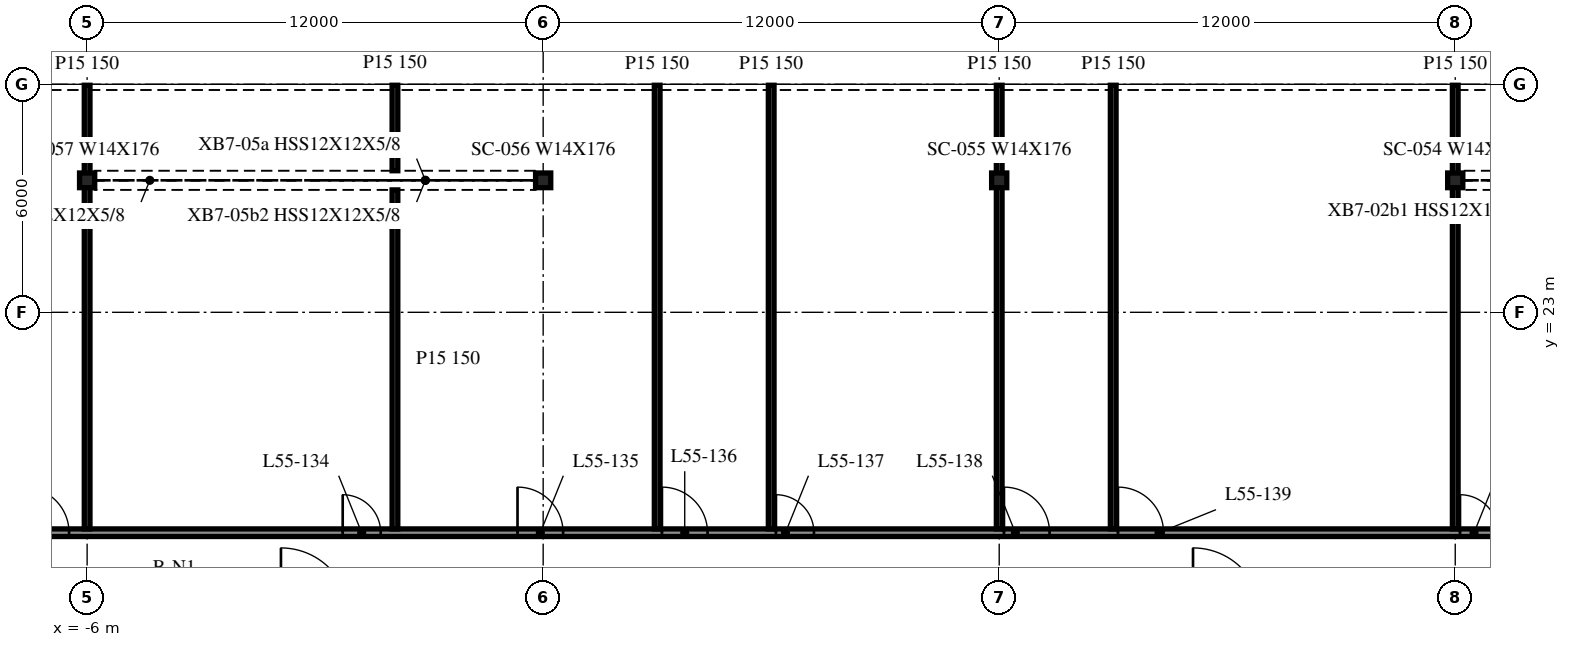
"""IFC4 building model, lengths in metres.
Left out: names, types, materials, properties, quantities, classifications, styles, units other than length and angle.
Written with IfcOpenShell. Run it as: python <this file> out.ifc"""

import sys

from ifc_helpers import new_model, si_unit, direction, frame, frame_2d, origin, origin_2d, place, context, subcontext, project, spatial, rectangle, i_section, extrude, element, fill, save


model = new_model("IFC4")
c1 = context("Model", 3, precision=1e-05, world=origin(), true_north=direction((0.0, 1.0)))
c2 = subcontext(c1, "Body", "Model", "MODEL_VIEW")
j1 = project(units=[si_unit("LENGTHUNIT", "METRE"), si_unit("PLANEANGLEUNIT", "RADIAN")], contexts=[c1])
p1 = place(None, origin())
s1 = spatial("IfcSite", under=j1, at=p1, CompositionType="ELEMENT")
p2 = place(p1, origin())
s2 = spatial("IfcBuilding", under=s1, at=p2, CompositionType="ELEMENT")
p3 = place(p2, frame((0.0, 0.0, 228.6)))
s3 = spatial("IfcBuildingStorey", under=s2, at=p3, CompositionType="ELEMENT", Elevation=228.6)
for number, where, z_axis, x_axis in (
    (1, (30.0, 26.473, -0.34), (0.0, 0.0, 1.0), (1.0, 0.0, 0.0)),
    (2, (18.0, 26.473, -0.34), (0.0, 0.0, 1.0), (1.0, 0.0, 0.0)),
    (3, (6.0, 26.473, -0.34), (0.0, 0.0, 1.0), (1.0, 0.0, 0.0)),
    (4, (-6.0, 26.473, -0.34), (0.0, 0.0, 1.0), (1.0, 0.0, 0.0)),
):
    element("IfcColumn", number, at=place(p3, frame(where, z_axis=z_axis, x_axis=x_axis)), inside=s3, PredefinedType="COLUMN", context=c2, shape_type="SweptSolid", body=[
        extrude(i_section(OverallWidth=0.399, OverallDepth=0.386, WebThickness=0.021, FlangeThickness=0.033, at=origin_2d()), origin(), (0.0, 0.0, 1.0), 3.8),
    ])
p4 = place(p3, frame((-41.975, 17.2, 0.0), z_axis=(0.0, 0.0, 1.0), x_axis=(1.0, 0.0, 0.0)))
e5 = element("IfcWall", 5, at=p4, inside=s3, PredefinedType="PARTITIONING", context=c2, shape_type="SweptSolid", body=[
    extrude(rectangle(XDim=95.95, YDim=0.2, at=frame_2d((47.975, 0.0))), origin(), (0.0, 0.0, 1.0), 3.46),
])
p5 = place(p4, frame((4.5, 0.0, 0.0)))
e6 = element("IfcOpeningElement", 6, at=p5, cuts=e5, PredefinedType="OPENING", context=c2, shape_type="SweptSolid", body=[
    extrude(rectangle(XDim=1.0, YDim=2.1, at=frame_2d((0.5, 1.05))), frame((0.0, 0.11, 0.0), z_axis=(0.0, -1.0, 0.0), x_axis=(1.0, 0.0, 0.0)), (0.0, 0.0, 1.0), 0.22),
])
p6 = place(p4, frame((13.3, 0.0, 0.0)))
e7 = element("IfcOpeningElement", 7, at=p6, cuts=e5, PredefinedType="OPENING", context=c2, shape_type="SweptSolid", body=[
    extrude(rectangle(XDim=1.2, YDim=2.1, at=frame_2d((0.6, 1.05))), frame((0.0, 0.11, 0.0), z_axis=(0.0, -1.0, 0.0), x_axis=(1.0, 0.0, 0.0)), (0.0, 0.0, 1.0), 0.22),
])
p7 = place(p4, frame((16.3, 0.0, 0.0)))
e8 = element("IfcOpeningElement", 8, at=p7, cuts=e5, PredefinedType="OPENING", context=c2, shape_type="SweptSolid", body=[
    extrude(rectangle(XDim=1.2, YDim=2.1, at=frame_2d((0.6, 1.05))), frame((0.0, 0.11, 0.0), z_axis=(0.0, -1.0, 0.0), x_axis=(1.0, 0.0, 0.0)), (0.0, 0.0, 1.0), 0.22),
])
p8 = place(p4, frame((22.5, 0.0, 0.0)))
e9 = element("IfcOpeningElement", 9, at=p8, cuts=e5, PredefinedType="OPENING", context=c2, shape_type="SweptSolid", body=[
    extrude(rectangle(XDim=1.0, YDim=2.1, at=frame_2d((0.5, 1.05))), frame((0.0, 0.11, 0.0), z_axis=(0.0, -1.0, 0.0), x_axis=(1.0, 0.0, 0.0)), (0.0, 0.0, 1.0), 0.22),
])
p9 = place(p4, frame((25.3, 0.0, 0.0)))
e10 = element("IfcOpeningElement", 10, at=p9, cuts=e5, PredefinedType="OPENING", context=c2, shape_type="SweptSolid", body=[
    extrude(rectangle(XDim=1.2, YDim=2.1, at=frame_2d((0.6, 1.05))), frame((0.0, 0.11, 0.0), z_axis=(0.0, -1.0, 0.0), x_axis=(1.0, 0.0, 0.0)), (0.0, 0.0, 1.0), 0.22),
])
p10 = place(p4, frame((34.3, 0.0, 0.0)))
e11 = element("IfcOpeningElement", 11, at=p10, cuts=e5, PredefinedType="OPENING", context=c2, shape_type="SweptSolid", body=[
    extrude(rectangle(XDim=1.2, YDim=2.1, at=frame_2d((0.6, 1.05))), frame((0.0, 0.11, 0.0), z_axis=(0.0, -1.0, 0.0), x_axis=(1.0, 0.0, 0.0)), (0.0, 0.0, 1.0), 0.22),
])
p11 = place(p4, frame((42.7, 0.0, 0.0)))
e12 = element("IfcOpeningElement", 12, at=p11, cuts=e5, PredefinedType="OPENING", context=c2, shape_type="SweptSolid", body=[
    extrude(rectangle(XDim=1.0, YDim=2.1, at=frame_2d((0.5, 1.05))), frame((0.0, 0.11, 0.0), z_axis=(0.0, -1.0, 0.0), x_axis=(1.0, 0.0, 0.0)), (0.0, 0.0, 1.0), 0.22),
])
p12 = place(p4, frame((47.3, 0.0, 0.0)))
e13 = element("IfcOpeningElement", 13, at=p12, cuts=e5, PredefinedType="OPENING", context=c2, shape_type="SweptSolid", body=[
    extrude(rectangle(XDim=1.2, YDim=2.1, at=frame_2d((0.6, 1.05))), frame((0.0, 0.11, 0.0), z_axis=(0.0, -1.0, 0.0), x_axis=(1.0, 0.0, 0.0)), (0.0, 0.0, 1.0), 0.22),
])
p13 = place(p4, frame((51.1, 0.0, 0.0)))
e14 = element("IfcOpeningElement", 14, at=p13, cuts=e5, PredefinedType="OPENING", context=c2, shape_type="SweptSolid", body=[
    extrude(rectangle(XDim=1.2, YDim=2.1, at=frame_2d((0.6, 1.05))), frame((0.0, 0.11, 0.0), z_axis=(0.0, -1.0, 0.0), x_axis=(1.0, 0.0, 0.0)), (0.0, 0.0, 1.0), 0.22),
])
p14 = place(p4, frame((54.1, 0.0, 0.0)))
e15 = element("IfcOpeningElement", 15, at=p14, cuts=e5, PredefinedType="OPENING", context=c2, shape_type="SweptSolid", body=[
    extrude(rectangle(XDim=1.0, YDim=2.1, at=frame_2d((0.5, 1.05))), frame((0.0, 0.11, 0.0), z_axis=(0.0, -1.0, 0.0), x_axis=(1.0, 0.0, 0.0)), (0.0, 0.0, 1.0), 0.22),
])
p15 = place(p4, frame((60.1, 0.0, 0.0)))
e16 = element("IfcOpeningElement", 16, at=p15, cuts=e5, PredefinedType="OPENING", context=c2, shape_type="SweptSolid", body=[
    extrude(rectangle(XDim=1.2, YDim=2.1, at=frame_2d((0.6, 1.05))), frame((0.0, 0.11, 0.0), z_axis=(0.0, -1.0, 0.0), x_axis=(1.0, 0.0, 0.0)), (0.0, 0.0, 1.0), 0.22),
])
p16 = place(p4, frame((63.1, 0.0, 0.0)))
e17 = element("IfcOpeningElement", 17, at=p16, cuts=e5, PredefinedType="OPENING", context=c2, shape_type="SweptSolid", body=[
    extrude(rectangle(XDim=1.2, YDim=2.1, at=frame_2d((0.6, 1.05))), frame((0.0, 0.11, 0.0), z_axis=(0.0, -1.0, 0.0), x_axis=(1.0, 0.0, 0.0)), (0.0, 0.0, 1.0), 0.22),
])
p17 = place(p4, frame((72.1, 0.0, 0.0)))
e18 = element("IfcOpeningElement", 18, at=p17, cuts=e5, PredefinedType="OPENING", context=c2, shape_type="SweptSolid", body=[
    extrude(rectangle(XDim=1.0, YDim=2.1, at=frame_2d((0.5, 1.05))), frame((0.0, 0.11, 0.0), z_axis=(0.0, -1.0, 0.0), x_axis=(1.0, 0.0, 0.0)), (0.0, 0.0, 1.0), 0.22),
])
p18 = place(p4, frame((78.1, 0.0, 0.0)))
e19 = element("IfcOpeningElement", 19, at=p18, cuts=e5, PredefinedType="OPENING", context=c2, shape_type="SweptSolid", body=[
    extrude(rectangle(XDim=1.2, YDim=2.1, at=frame_2d((0.6, 1.05))), frame((0.0, 0.11, 0.0), z_axis=(0.0, -1.0, 0.0), x_axis=(1.0, 0.0, 0.0)), (0.0, 0.0, 1.0), 0.22),
])
p19 = place(p4, frame((87.1, 0.0, 0.0)))
e20 = element("IfcOpeningElement", 20, at=p19, cuts=e5, PredefinedType="OPENING", context=c2, shape_type="SweptSolid", body=[
    extrude(rectangle(XDim=1.2, YDim=2.1, at=frame_2d((0.6, 1.05))), frame((0.0, 0.11, 0.0), z_axis=(0.0, -1.0, 0.0), x_axis=(1.0, 0.0, 0.0)), (0.0, 0.0, 1.0), 0.22),
])
p20 = place(p4, frame((90.1, 0.0, 0.0)))
e21 = element("IfcOpeningElement", 21, at=p20, cuts=e5, PredefinedType="OPENING", context=c2, shape_type="SweptSolid", body=[
    extrude(rectangle(XDim=1.0, YDim=2.1, at=frame_2d((0.5, 1.05))), frame((0.0, 0.11, 0.0), z_axis=(0.0, -1.0, 0.0), x_axis=(1.0, 0.0, 0.0)), (0.0, 0.0, 1.0), 0.22),
])
p21 = place(p3, frame((-6.0, 17.3, 0.0), z_axis=(0.0, 0.0, 1.0), x_axis=(0.0, 1.0, 0.0)))
e22 = element("IfcWall", 22, at=p21, inside=s3, PredefinedType="PARTITIONING", context=c2, shape_type="SweptSolid", body=[
    extrude(rectangle(XDim=11.675, YDim=0.15, at=frame_2d((5.837, 0.0))), origin(), (0.0, 0.0, 1.0), 3.46),
])
p22 = place(p3, frame((2.1, 17.3, 0.0), z_axis=(0.0, 0.0, 1.0), x_axis=(0.0, 1.0, 0.0)))
e23 = element("IfcWall", 23, at=p22, inside=s3, PredefinedType="PARTITIONING", context=c2, shape_type="SweptSolid", body=[
    extrude(rectangle(XDim=8.921, YDim=0.15, at=frame_2d((4.46, 0.0))), origin(), (0.0, 0.0, 1.0), 3.46),
])
p23 = place(p3, frame((2.1, 26.725, 0.0), z_axis=(0.0, 0.0, 1.0), x_axis=(0.0, 1.0, 0.0)))
e24 = element("IfcWall", 24, at=p23, inside=s3, PredefinedType="PARTITIONING", context=c2, shape_type="SweptSolid", body=[
    extrude(rectangle(XDim=2.25, YDim=0.15, at=frame_2d((1.125, 0.0))), origin(), (0.0, 0.0, 1.0), 3.46),
])
for number, where, z_axis, x_axis in (
    (25, (9.0, 17.3, 0.0), (0.0, 0.0, 1.0), (0.0, 1.0, 0.0)),
    (26, (12.0, 17.3, 0.0), (0.0, 0.0, 1.0), (0.0, 1.0, 0.0)),
    (27, (18.0, 17.3, 0.0), (0.0, 0.0, 1.0), (0.0, 1.0, 0.0)),
    (28, (21.0, 17.3, 0.0), (0.0, 0.0, 1.0), (0.0, 1.0, 0.0)),
    (29, (30.0, 17.3, 0.0), (0.0, 0.0, 1.0), (0.0, 1.0, 0.0)),
):
    element("IfcWall", number, at=place(p3, frame(where, z_axis=z_axis, x_axis=x_axis)), inside=s3, PredefinedType="PARTITIONING", context=c2, shape_type="SweptSolid", body=[
        extrude(rectangle(XDim=11.675, YDim=0.15, at=frame_2d((5.837, 0.0))), origin(), (0.0, 0.0, 1.0), 3.46),
    ])
p24 = place(p10, origin())
e30 = element("IfcDoor", 30, at=p24, inside=s3, OperationType="SINGLE_SWING_LEFT", PredefinedType="DOOR", context=c2, shape_type="SweptSolid", body=[
    extrude(rectangle(XDim=1.2, YDim=2.1, at=frame_2d((0.6, 1.05))), frame((0.0, 0.025, 0.0), z_axis=(0.0, -1.0, 0.0), x_axis=(1.0, 0.0, 0.0)), (0.0, 0.0, 1.0), 0.05),
])
fill(e11, e30)
p25 = place(p11, origin())
e31 = element("IfcDoor", 31, at=p25, inside=s3, OperationType="SINGLE_SWING_LEFT", PredefinedType="DOOR", context=c2, shape_type="SweptSolid", body=[
    extrude(rectangle(XDim=1.0, YDim=2.1, at=frame_2d((0.5, 1.05))), frame((0.0, 0.025, 0.0), z_axis=(0.0, -1.0, 0.0), x_axis=(1.0, 0.0, 0.0)), (0.0, 0.0, 1.0), 0.05),
])
fill(e12, e31)
p26 = place(p12, origin())
e32 = element("IfcDoor", 32, at=p26, inside=s3, OperationType="SINGLE_SWING_RIGHT", PredefinedType="DOOR", context=c2, shape_type="SweptSolid", body=[
    extrude(rectangle(XDim=1.2, YDim=2.1, at=frame_2d((0.6, 1.05))), frame((0.0, 0.025, 0.0), z_axis=(0.0, -1.0, 0.0), x_axis=(1.0, 0.0, 0.0)), (0.0, 0.0, 1.0), 0.05),
])
fill(e13, e32)
p27 = place(p13, origin())
e33 = element("IfcDoor", 33, at=p27, inside=s3, OperationType="SINGLE_SWING_RIGHT", PredefinedType="DOOR", context=c2, shape_type="SweptSolid", body=[
    extrude(rectangle(XDim=1.2, YDim=2.1, at=frame_2d((0.6, 1.05))), frame((0.0, 0.025, 0.0), z_axis=(0.0, -1.0, 0.0), x_axis=(1.0, 0.0, 0.0)), (0.0, 0.0, 1.0), 0.05),
])
fill(e14, e33)
p28 = place(p14, origin())
e34 = element("IfcDoor", 34, at=p28, inside=s3, OperationType="SINGLE_SWING_RIGHT", PredefinedType="DOOR", context=c2, shape_type="SweptSolid", body=[
    extrude(rectangle(XDim=1.0, YDim=2.1, at=frame_2d((0.5, 1.05))), frame((0.0, 0.025, 0.0), z_axis=(0.0, -1.0, 0.0), x_axis=(1.0, 0.0, 0.0)), (0.0, 0.0, 1.0), 0.05),
])
fill(e15, e34)
p29 = place(p15, origin())
e35 = element("IfcDoor", 35, at=p29, inside=s3, OperationType="SINGLE_SWING_RIGHT", PredefinedType="DOOR", context=c2, shape_type="SweptSolid", body=[
    extrude(rectangle(XDim=1.2, YDim=2.1, at=frame_2d((0.6, 1.05))), frame((0.0, 0.025, 0.0), z_axis=(0.0, -1.0, 0.0), x_axis=(1.0, 0.0, 0.0)), (0.0, 0.0, 1.0), 0.05),
])
fill(e16, e35)
p30 = place(p16, origin())
e36 = element("IfcDoor", 36, at=p30, inside=s3, OperationType="SINGLE_SWING_RIGHT", PredefinedType="DOOR", context=c2, shape_type="SweptSolid", body=[
    extrude(rectangle(XDim=1.2, YDim=2.1, at=frame_2d((0.6, 1.05))), frame((0.0, 0.025, 0.0), z_axis=(0.0, -1.0, 0.0), x_axis=(1.0, 0.0, 0.0)), (0.0, 0.0, 1.0), 0.05),
])
fill(e17, e36)
p31 = place(p17, origin())
e37 = element("IfcDoor", 37, at=p31, inside=s3, OperationType="SINGLE_SWING_RIGHT", PredefinedType="DOOR", context=c2, shape_type="SweptSolid", body=[
    extrude(rectangle(XDim=1.0, YDim=2.1, at=frame_2d((0.5, 1.05))), frame((0.0, 0.025, 0.0), z_axis=(0.0, -1.0, 0.0), x_axis=(1.0, 0.0, 0.0)), (0.0, 0.0, 1.0), 0.05),
])
fill(e18, e37)
save(model, sys.argv[1])
